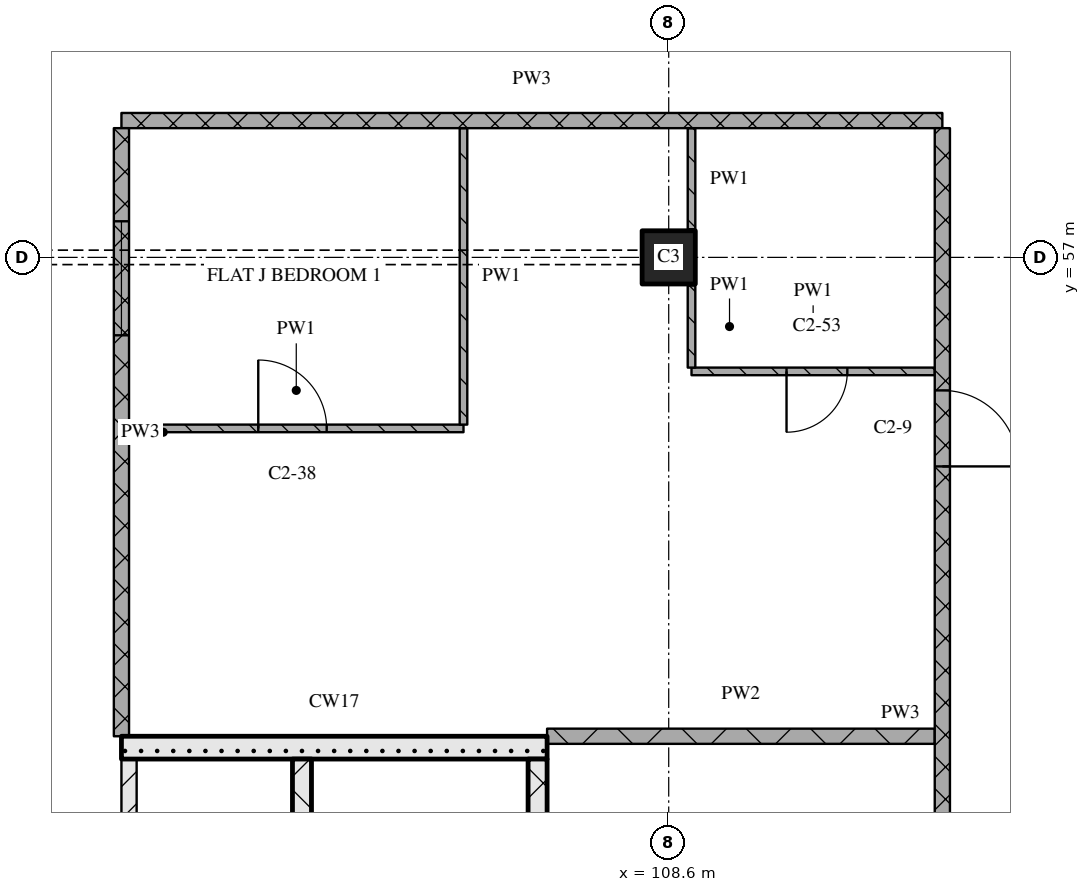
"""IFC4 building model, lengths in metres.
Left out: names, types, materials, properties, quantities, classifications, styles, units other than length and angle.
Written with IfcOpenShell. Run it as: python <this file> out.ifc"""

import sys

from ifc_helpers import new_model, si_unit, direction, frame, frame_2d, origin, origin_2d, place, context, subcontext, project, spatial, rectangle, extrude, element, fill, save


model = new_model("IFC4")
c1 = context("Model", 3, precision=1e-05, world=origin(), true_north=direction((0.0, 1.0)))
c2 = subcontext(c1, "Body", "Model", "MODEL_VIEW")
j1 = project(units=[si_unit("LENGTHUNIT", "METRE"), si_unit("PLANEANGLEUNIT", "RADIAN")], contexts=[c1])
p1 = place(None, origin())
s1 = spatial("IfcSite", under=j1, at=p1, CompositionType="ELEMENT")
p2 = place(p1, origin())
s2 = spatial("IfcBuilding", under=s1, at=p2, CompositionType="ELEMENT")
p3 = place(p2, frame((0.0, 0.0, 158.25)))
s3 = spatial("IfcBuildingStorey", under=s2, at=p3, CompositionType="ELEMENT", Elevation=158.25)
p4 = place(p3, frame((108.6, 57.0, 0.0), z_axis=(0.0, 0.0, 1.0), x_axis=(1.0, 0.0, 0.0)))
e1 = element("IfcColumn", 1, at=p4, inside=s3, PredefinedType="COLUMN", context=c2, shape_type="SweptSolid", body=[
    extrude(rectangle(XDim=0.7, YDim=0.7, at=origin_2d()), origin(), (0.0, 0.0, 1.0), 3.6),
])
p5 = place(p3, frame((101.5, 43.5, 0.0), z_axis=(0.0, 0.0, 1.0), x_axis=(0.0, 1.0, 0.0)))
e2 = element("IfcWall", 2, at=p5, inside=s3, PredefinedType="PARTITIONING", context=c2, shape_type="SweptSolid", body=[
    extrude(rectangle(XDim=6.9, YDim=0.2, at=frame_2d((3.45, 0.0))), origin(), (0.0, 0.0, 1.0), 3.32),
])
p6 = place(p5, frame((1.0, 0.0, 0.0)))
e3 = element("IfcOpeningElement", 3, at=p6, cuts=e2, PredefinedType="OPENING", context=c2, shape_type="SweptSolid", body=[
    extrude(rectangle(XDim=1.0, YDim=2.1, at=frame_2d((0.5, 1.05))), frame((0.0, 0.11, 0.0), z_axis=(0.0, -1.0, 0.0), x_axis=(1.0, 0.0, 0.0)), (0.0, 0.0, 1.0), 0.22),
])
p7 = place(p3, frame((103.775, 43.5, 0.0), z_axis=(0.0, 0.0, 1.0), x_axis=(0.0, 1.0, 0.0)))
e4 = element("IfcWall", 4, at=p7, inside=s3, PredefinedType="SOLIDWALL", context=c2, shape_type="SweptSolid", body=[
    extrude(rectangle(XDim=6.9, YDim=0.25, at=frame_2d((3.45, 0.0))), origin(), (0.0, 0.0, 1.0), 3.32),
])
p8 = place(p7, frame((0.2, 0.0, 0.0)))
e5 = element("IfcOpeningElement", 5, at=p8, cuts=e4, PredefinedType="OPENING", context=c2, shape_type="SweptSolid", body=[
    extrude(rectangle(XDim=1.0, YDim=2.1, at=frame_2d((0.5, 1.05))), frame((0.0, 0.135, 0.0), z_axis=(0.0, -1.0, 0.0), x_axis=(1.0, 0.0, 0.0)), (0.0, 0.0, 1.0), 0.27),
])
p9 = place(p3, frame((106.875, 43.5, 0.0), z_axis=(0.0, 0.0, 1.0), x_axis=(0.0, 1.0, 0.0)))
e6 = element("IfcWall", 6, at=p9, inside=s3, PredefinedType="SOLIDWALL", context=c2, shape_type="SweptSolid", body=[
    extrude(rectangle(XDim=6.9, YDim=0.25, at=frame_2d((3.45, 0.0))), origin(), (0.0, 0.0, 1.0), 3.32),
])
p10 = place(p3, frame((101.4, 50.55, 0.0), z_axis=(0.0, 0.0, 1.0), x_axis=(1.0, 0.0, 0.0)))
e7 = element("IfcWall", 7, at=p10, inside=s3, PredefinedType="SOLIDWALL", context=c2, shape_type="SweptSolid", body=[
    extrude(rectangle(XDim=5.6, YDim=0.3, at=frame_2d((2.8, 0.0))), origin(), (0.0, 0.0, 1.0), 3.32),
])
p11 = place(p3, frame((107.0, 50.7, 0.0), z_axis=(0.0, 0.0, 1.0), x_axis=(1.0, 0.0, 0.0)))
e8 = element("IfcWall", 8, at=p11, inside=s3, PredefinedType="PARTITIONING", context=c2, shape_type="SweptSolid", body=[
    extrude(rectangle(XDim=5.1, YDim=0.2, at=frame_2d((2.55, 0.0))), origin(), (0.0, 0.0, 1.0), 3.32),
])
p12 = place(p3, frame((101.5, 54.75, 0.0), z_axis=(0.0, 0.0, 1.0), x_axis=(1.0, 0.0, 0.0)))
e9 = element("IfcWall", 9, at=p12, inside=s3, PredefinedType="PARTITIONING", context=c2, shape_type="SweptSolid", body=[
    extrude(rectangle(XDim=4.4, YDim=0.1, at=frame_2d((2.2, 0.0))), origin(), (0.0, 0.0, 1.0), 3.32),
])
p13 = place(p12, frame((1.7, 0.0, 0.0)))
e10 = element("IfcOpeningElement", 10, at=p13, cuts=e9, PredefinedType="OPENING", context=c2, shape_type="SweptSolid", body=[
    extrude(rectangle(XDim=0.9, YDim=2.1, at=frame_2d((0.45, 1.05))), frame((0.0, 0.06, 0.0), z_axis=(0.0, -1.0, 0.0), x_axis=(1.0, 0.0, 0.0)), (0.0, 0.0, 1.0), 0.12),
])
p14 = place(p3, frame((108.9, 55.5, 0.0), z_axis=(0.0, 0.0, 1.0), x_axis=(1.0, 0.0, 0.0)))
e11 = element("IfcWall", 11, at=p14, inside=s3, PredefinedType="PARTITIONING", context=c2, shape_type="SweptSolid", body=[
    extrude(rectangle(XDim=3.2, YDim=0.1, at=frame_2d((1.6, 0.0))), origin(), (0.0, 0.0, 1.0), 3.32),
])
p15 = place(p14, frame((1.25, 0.0, 0.0)))
e12 = element("IfcOpeningElement", 12, at=p15, cuts=e11, PredefinedType="OPENING", context=c2, shape_type="SweptSolid", body=[
    extrude(rectangle(XDim=0.8, YDim=2.1, at=frame_2d((0.4, 1.05))), frame((0.0, 0.06, 0.0), z_axis=(0.0, -1.0, 0.0), x_axis=(1.0, 0.0, 0.0)), (0.0, 0.0, 1.0), 0.12),
])
p16 = place(p3, frame((101.4, 58.8, 0.0), z_axis=(0.0, 0.0, 1.0), x_axis=(1.0, 0.0, 0.0)))
e13 = element("IfcWall", 13, at=p16, inside=s3, PredefinedType="PARTITIONING", context=c2, shape_type="SweptSolid", body=[
    extrude(rectangle(XDim=10.8, YDim=0.2, at=frame_2d((5.4, 0.0))), origin(), (0.0, 0.0, 1.0), 3.32),
])
p17 = place(p3, frame((101.4, 58.7, 0.0), z_axis=(0.0, 0.0, 1.0), x_axis=(0.0, -1.0, 0.0)))
e14 = element("IfcWall", 14, at=p17, inside=s3, PredefinedType="PARTITIONING", context=c2, shape_type="SweptSolid", body=[
    extrude(rectangle(XDim=8.0, YDim=0.2, at=frame_2d((4.0, 0.0))), origin(), (0.0, 0.0, 1.0), 3.32),
])
p18 = place(p17, frame((1.225, 0.0, 0.9)))
e15 = element("IfcOpeningElement", 15, at=p18, cuts=e14, PredefinedType="OPENING", context=c2, shape_type="SweptSolid", body=[
    extrude(rectangle(XDim=1.5, YDim=1.5, at=frame_2d((0.75, 0.75))), frame((0.0, 0.11, 0.0), z_axis=(0.0, -1.0, 0.0), x_axis=(1.0, 0.0, 0.0)), (0.0, 0.0, 1.0), 0.22),
])
p19 = place(p3, frame((105.9, 58.7, 0.0), z_axis=(0.0, 0.0, 1.0), x_axis=(0.0, -1.0, 0.0)))
e16 = element("IfcWall", 16, at=p19, inside=s3, PredefinedType="PARTITIONING", context=c2, shape_type="SweptSolid", body=[
    extrude(rectangle(XDim=3.9, YDim=0.1, at=frame_2d((1.95, 0.0))), origin(), (0.0, 0.0, 1.0), 3.32),
])
p20 = place(p3, frame((108.9, 56.63, 0.0), z_axis=(0.0, 0.0, 1.0), x_axis=(0.0, -1.0, 0.0)))
e17 = element("IfcWall", 17, at=p20, inside=s3, PredefinedType="PARTITIONING", context=c2, shape_type="SweptSolid", body=[
    extrude(rectangle(XDim=1.08, YDim=0.1, at=frame_2d((0.54, 0.0))), origin(), (0.0, 0.0, 1.0), 3.32),
])
p21 = place(p3, frame((108.9, 58.7, 0.0), z_axis=(0.0, 0.0, 1.0), x_axis=(0.0, -1.0, 0.0)))
e18 = element("IfcWall", 18, at=p21, inside=s3, PredefinedType="PARTITIONING", context=c2, shape_type="SweptSolid", body=[
    extrude(rectangle(XDim=1.33, YDim=0.1, at=frame_2d((0.665, 0.0))), origin(), (0.0, 0.0, 1.0), 3.32),
])
p22 = place(p3, frame((112.2, 43.3, 0.0), z_axis=(0.0, 0.0, 1.0), x_axis=(0.0, 1.0, 0.0)))
e19 = element("IfcWall", 19, at=p22, inside=s3, PredefinedType="PARTITIONING", context=c2, shape_type="SweptSolid", body=[
    extrude(rectangle(XDim=15.4, YDim=0.2, at=frame_2d((7.7, 0.0))), origin(), (0.0, 0.0, 1.0), 3.32),
])
p23 = place(p22, frame((10.95, 0.0, 0.0)))
e20 = element("IfcOpeningElement", 20, at=p23, cuts=e19, PredefinedType="OPENING", context=c2, shape_type="SweptSolid", body=[
    extrude(rectangle(XDim=1.0, YDim=2.1, at=frame_2d((0.5, 1.05))), frame((0.0, 0.11, 0.0), z_axis=(0.0, -1.0, 0.0), x_axis=(1.0, 0.0, 0.0)), (0.0, 0.0, 1.0), 0.22),
])
p24 = place(p13, origin())
e21 = element("IfcDoor", 21, at=p24, inside=s3, OperationType="SINGLE_SWING_LEFT", PredefinedType="DOOR", context=c2, shape_type="SweptSolid", body=[
    extrude(rectangle(XDim=0.9, YDim=2.1, at=frame_2d((0.45, 1.05))), frame((0.0, 0.025, 0.0), z_axis=(0.0, -1.0, 0.0), x_axis=(1.0, 0.0, 0.0)), (0.0, 0.0, 1.0), 0.05),
])
fill(e10, e21)
p25 = place(p15, origin())
e22 = element("IfcDoor", 22, at=p25, inside=s3, OperationType="SINGLE_SWING_RIGHT", PredefinedType="DOOR", context=c2, shape_type="SweptSolid", body=[
    extrude(rectangle(XDim=0.8, YDim=2.1, at=frame_2d((0.4, 1.05))), frame((0.0, 0.025, 0.0), z_axis=(0.0, -1.0, 0.0), x_axis=(1.0, 0.0, 0.0)), (0.0, 0.0, 1.0), 0.05),
])
fill(e12, e22)
p26 = place(p23, origin())
e23 = element("IfcDoor", 23, at=p26, inside=s3, OperationType="SINGLE_SWING_RIGHT", PredefinedType="DOOR", context=c2, shape_type="SweptSolid", body=[
    extrude(rectangle(XDim=1.0, YDim=2.1, at=frame_2d((0.5, 1.05))), frame((0.0, 0.025, 0.0), z_axis=(0.0, -1.0, 0.0), x_axis=(1.0, 0.0, 0.0)), (0.0, 0.0, 1.0), 0.05),
])
fill(e20, e23)
p27 = place(p18, origin())
e24 = element("IfcWindow", 24, at=p27, inside=s3, PartitioningType="SINGLE_PANEL", PredefinedType="WINDOW", context=c2, shape_type="SweptSolid", body=[
    extrude(rectangle(XDim=1.5, YDim=1.5, at=frame_2d((0.75, 0.75))), frame((0.0, 0.03, 0.0), z_axis=(0.0, -1.0, 0.0), x_axis=(1.0, 0.0, 0.0)), (0.0, 0.0, 1.0), 0.06),
])
fill(e15, e24)
save(model, sys.argv[1])
